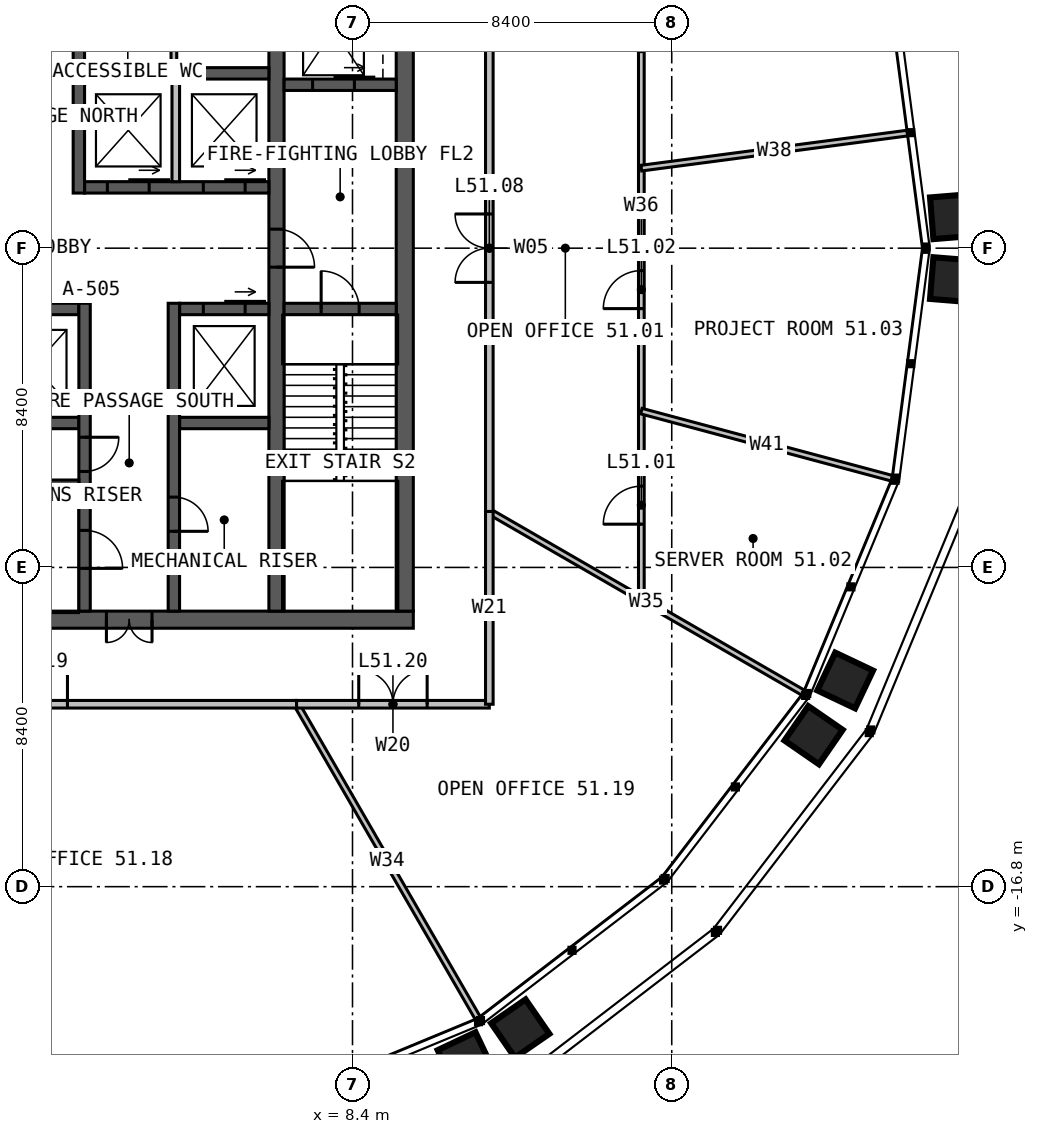
"""IFC4 building model, lengths in metres.
Left out: names, types, materials, properties, quantities, classifications, styles, units other than length and angle.
Written with IfcOpenShell. Run it as: python <this file> out.ifc"""

import sys

from ifc_helpers import new_model, si_unit, direction, frame, frame_2d, origin, place, context, subcontext, project, spatial, rectangle, extrude, element, fill, save


model = new_model("IFC4")
c1 = context("Model", 3, precision=1e-05, world=origin(), true_north=direction((0.0, 1.0)))
c2 = subcontext(c1, "Body", "Model", "MODEL_VIEW")
j1 = project(units=[si_unit("LENGTHUNIT", "METRE"), si_unit("PLANEANGLEUNIT", "RADIAN")], contexts=[c1])
p1 = place(None, origin())
s1 = spatial("IfcSite", under=j1, at=p1, CompositionType="ELEMENT")
p2 = place(p1, origin())
s2 = spatial("IfcBuilding", under=s1, at=p2, CompositionType="ELEMENT")
p3 = place(p2, frame((0.0, 0.0, 211.0)))
s3 = spatial("IfcBuildingStorey", under=s2, at=p3, CompositionType="ELEMENT", Elevation=211.0)
p4 = place(p3, frame((10.0, -9.775, 0.0), z_axis=(0.0, 0.0, 1.0), x_axis=(-1.0, 0.0, 0.0)))
e1 = element("IfcWall", 1, at=p4, inside=s3, PredefinedType="SOLIDWALL", context=c2, shape_type="SweptSolid", body=[
    extrude(rectangle(XDim=20.0, YDim=0.45, at=frame_2d((10.0, 0.0))), origin(), (0.0, 0.0, 1.0), 4.0),
])
p5 = place(p4, frame((6.875, 0.0, 0.0)))
e2 = element("IfcOpeningElement", 2, at=p5, cuts=e1, PredefinedType="OPENING", context=c2, shape_type="SweptSolid", body=[
    extrude(rectangle(XDim=1.2, YDim=2.2, at=frame_2d((0.6, 1.1))), frame((0.0, 0.235, 0.0), z_axis=(0.0, -1.0, 0.0), x_axis=(1.0, 0.0, 0.0)), (0.0, 0.0, 1.0), 0.47),
])
p6 = place(p3, frame((9.775, -9.55, 0.0), z_axis=(0.0, 0.0, 1.0), x_axis=(0.0, 1.0, 0.0)))
e3 = element("IfcWall", 3, at=p6, inside=s3, PredefinedType="SOLIDWALL", context=c2, shape_type="SweptSolid", body=[
    extrude(rectangle(XDim=19.1, YDim=0.45, at=frame_2d((9.55, 0.0))), origin(), (0.0, 0.0, 1.0), 4.0),
])
p7 = place(p3, frame((6.4, 9.55, 0.0), z_axis=(0.0, 0.0, 1.0), x_axis=(0.0, -1.0, 0.0)))
e4 = element("IfcWall", 4, at=p7, inside=s3, PredefinedType="SOLIDWALL", context=c2, shape_type="SweptSolid", body=[
    extrude(rectangle(XDim=19.1, YDim=0.4, at=frame_2d((9.55, 0.0))), origin(), (0.0, 0.0, 1.0), 4.0),
])
p8 = place(p7, frame((9.05, 0.0, 0.0)))
e5 = element("IfcOpeningElement", 5, at=p8, cuts=e4, PredefinedType="OPENING", context=c2, shape_type="SweptSolid", body=[
    extrude(rectangle(XDim=1.0, YDim=2.2, at=frame_2d((0.5, 1.1))), frame((0.0, 0.21, 0.0), z_axis=(0.0, -1.0, 0.0), x_axis=(1.0, 0.0, 0.0)), (0.0, 0.0, 1.0), 0.42),
])
p9 = place(p3, frame((1.35, 1.6, 0.0), z_axis=(0.0, 0.0, 1.0), x_axis=(1.0, 0.0, 0.0)))
e6 = element("IfcWall", 6, at=p9, inside=s3, PredefinedType="SOLIDWALL", context=c2, shape_type="SweptSolid", body=[
    extrude(rectangle(XDim=4.85, YDim=0.3, at=frame_2d((2.425, 0.0))), origin(), (0.0, 0.0, 1.0), 4.0),
])
p10 = place(p9, frame((0.6, 0.0, 0.0)))
e7 = element("IfcOpeningElement", 7, at=p10, cuts=e6, PredefinedType="OPENING", context=c2, shape_type="SweptSolid", body=[
    extrude(rectangle(XDim=1.1, YDim=2.2, at=frame_2d((0.55, 1.1))), frame((0.0, 0.16, 0.0), z_axis=(0.0, -1.0, 0.0), x_axis=(1.0, 0.0, 0.0)), (0.0, 0.0, 1.0), 0.32),
])
p11 = place(p9, frame((3.125, 0.0, 0.0)))
e8 = element("IfcOpeningElement", 8, at=p11, cuts=e6, PredefinedType="OPENING", context=c2, shape_type="SweptSolid", body=[
    extrude(rectangle(XDim=1.1, YDim=2.2, at=frame_2d((0.55, 1.1))), frame((0.0, 0.16, 0.0), z_axis=(0.0, -1.0, 0.0), x_axis=(1.0, 0.0, 0.0)), (0.0, 0.0, 1.0), 0.32),
])
p12 = place(p3, frame((1.35, 4.6, 0.0), z_axis=(0.0, 0.0, 1.0), x_axis=(1.0, 0.0, 0.0)))
e9 = element("IfcWall", 9, at=p12, inside=s3, PredefinedType="SOLIDWALL", context=c2, shape_type="SweptSolid", body=[
    extrude(rectangle(XDim=4.85, YDim=0.3, at=frame_2d((2.425, 0.0))), origin(), (0.0, 0.0, 1.0), 4.0),
])
p13 = place(p3, frame((1.2, 1.45, 0.0), z_axis=(0.0, 0.0, 1.0), x_axis=(0.0, 1.0, 0.0)))
e10 = element("IfcWall", 10, at=p13, inside=s3, PredefinedType="SOLIDWALL", context=c2, shape_type="SweptSolid", body=[
    extrude(rectangle(XDim=8.1, YDim=0.3, at=frame_2d((4.05, 0.0))), origin(), (0.0, 0.0, 1.0), 4.0),
])
p14 = place(p13, frame((3.8, 0.0, 0.0)))
e11 = element("IfcOpeningElement", 11, at=p14, cuts=e10, PredefinedType="OPENING", context=c2, shape_type="SweptSolid", body=[
    extrude(rectangle(XDim=1.0, YDim=2.2, at=frame_2d((0.5, 1.1))), frame((0.0, 0.16, 0.0), z_axis=(0.0, -1.0, 0.0), x_axis=(1.0, 0.0, 0.0)), (0.0, 0.0, 1.0), 0.32),
])
p15 = place(p13, frame((6.15, 0.0, 0.0)))
e12 = element("IfcOpeningElement", 12, at=p15, cuts=e10, PredefinedType="OPENING", context=c2, shape_type="SweptSolid", body=[
    extrude(rectangle(XDim=1.0, YDim=2.2, at=frame_2d((0.5, 1.1))), frame((0.0, 0.16, 0.0), z_axis=(0.0, -1.0, 0.0), x_axis=(1.0, 0.0, 0.0)), (0.0, 0.0, 1.0), 0.32),
])
p16 = place(p3, frame((-6.2, -1.6, 0.0), z_axis=(0.0, 0.0, 1.0), x_axis=(1.0, 0.0, 0.0)))
e13 = element("IfcWall", 13, at=p16, inside=s3, PredefinedType="SOLIDWALL", context=c2, shape_type="SweptSolid", body=[
    extrude(rectangle(XDim=7.4, YDim=0.3, at=frame_2d((3.7, 0.0))), origin(), (0.0, 0.0, 1.0), 4.0),
])
p17 = place(p3, frame((3.85, -1.6, 0.0), z_axis=(0.0, 0.0, 1.0), x_axis=(1.0, 0.0, 0.0)))
e14 = element("IfcWall", 14, at=p17, inside=s3, PredefinedType="SOLIDWALL", context=c2, shape_type="SweptSolid", body=[
    extrude(rectangle(XDim=2.35, YDim=0.3, at=frame_2d((1.175, 0.0))), origin(), (0.0, 0.0, 1.0), 4.0),
])
p18 = place(p17, frame((0.625, 0.0, 0.0)))
e15 = element("IfcOpeningElement", 15, at=p18, cuts=e14, PredefinedType="OPENING", context=c2, shape_type="SweptSolid", body=[
    extrude(rectangle(XDim=1.1, YDim=2.2, at=frame_2d((0.55, 1.1))), frame((0.0, 0.16, 0.0), z_axis=(0.0, -1.0, 0.0), x_axis=(1.0, 0.0, 0.0)), (0.0, 0.0, 1.0), 0.32),
])
p19 = place(p3, frame((-6.2, -4.6, 0.0), z_axis=(0.0, 0.0, 1.0), x_axis=(1.0, 0.0, 0.0)))
e16 = element("IfcWall", 16, at=p19, inside=s3, PredefinedType="SOLIDWALL", context=c2, shape_type="SweptSolid", body=[
    extrude(rectangle(XDim=7.4, YDim=0.3, at=frame_2d((3.7, 0.0))), origin(), (0.0, 0.0, 1.0), 4.0),
])
p20 = place(p3, frame((3.85, -4.6, 0.0), z_axis=(0.0, 0.0, 1.0), x_axis=(1.0, 0.0, 0.0)))
e17 = element("IfcWall", 17, at=p20, inside=s3, PredefinedType="SOLIDWALL", context=c2, shape_type="SweptSolid", body=[
    extrude(rectangle(XDim=2.35, YDim=0.3, at=frame_2d((1.175, 0.0))), origin(), (0.0, 0.0, 1.0), 4.0),
])
p21 = place(p3, frame((1.35, -1.45, 0.0), z_axis=(0.0, 0.0, 1.0), x_axis=(0.0, -1.0, 0.0)))
e18 = element("IfcWall", 18, at=p21, inside=s3, PredefinedType="SOLIDWALL", context=c2, shape_type="SweptSolid", body=[
    extrude(rectangle(XDim=8.1, YDim=0.3, at=frame_2d((4.05, 0.0))), origin(), (0.0, 0.0, 1.0), 4.0),
])
p22 = place(p21, frame((5.975, 0.0, 0.0)))
e19 = element("IfcOpeningElement", 19, at=p22, cuts=e18, PredefinedType="OPENING", context=c2, shape_type="SweptSolid", body=[
    extrude(rectangle(XDim=1.0, YDim=2.2, at=frame_2d((0.5, 1.1))), frame((0.0, 0.16, 0.0), z_axis=(0.0, -1.0, 0.0), x_axis=(1.0, 0.0, 0.0)), (0.0, 0.0, 1.0), 0.32),
])
p23 = place(p21, frame((3.525, 0.0, 0.0)))
e20 = element("IfcOpeningElement", 20, at=p23, cuts=e18, PredefinedType="OPENING", context=c2, shape_type="SweptSolid", body=[
    extrude(rectangle(XDim=0.9, YDim=2.2, at=frame_2d((0.45, 1.1))), frame((0.0, 0.16, 0.0), z_axis=(0.0, -1.0, 0.0), x_axis=(1.0, 0.0, 0.0)), (0.0, 0.0, 1.0), 0.32),
])
p24 = place(p3, frame((3.7, -1.45, 0.0), z_axis=(0.0, 0.0, 1.0), x_axis=(0.0, -1.0, 0.0)))
e21 = element("IfcWall", 21, at=p24, inside=s3, PredefinedType="SOLIDWALL", context=c2, shape_type="SweptSolid", body=[
    extrude(rectangle(XDim=8.1, YDim=0.3, at=frame_2d((4.05, 0.0))), origin(), (0.0, 0.0, 1.0), 4.0),
])
p25 = place(p24, frame((5.1, 0.0, 0.0)))
e22 = element("IfcOpeningElement", 22, at=p25, cuts=e21, PredefinedType="OPENING", context=c2, shape_type="SweptSolid", body=[
    extrude(rectangle(XDim=0.9, YDim=2.2, at=frame_2d((0.45, 1.1))), frame((0.0, 0.16, 0.0), z_axis=(0.0, -1.0, 0.0), x_axis=(1.0, 0.0, 0.0)), (0.0, 0.0, 1.0), 0.32),
])
p26 = place(p3, frame((-6.2, -6.2, 0.0), z_axis=(0.0, 0.0, 1.0), x_axis=(1.0, 0.0, 0.0)))
e23 = element("IfcWall", 23, at=p26, inside=s3, PredefinedType="SOLIDWALL", context=c2, shape_type="SweptSolid", body=[
    extrude(rectangle(XDim=7.4, YDim=0.2, at=frame_2d((3.7, 0.0))), origin(), (0.0, 0.0, 1.0), 4.0),
])
p27 = place(p3, frame((6.6, -1.6, 0.0), z_axis=(0.0, 0.0, 1.0), x_axis=(1.0, 0.0, 0.0)))
e24 = element("IfcWall", 24, at=p27, inside=s3, PredefinedType="SOLIDWALL", context=c2, shape_type="SweptSolid", body=[
    extrude(rectangle(XDim=2.95, YDim=0.3, at=frame_2d((1.475, 0.0))), origin(), (0.0, 0.0, 1.0), 4.0),
])
p28 = place(p27, frame((0.975, 0.0, 0.0)))
e25 = element("IfcOpeningElement", 25, at=p28, cuts=e24, PredefinedType="OPENING", context=c2, shape_type="SweptSolid", body=[
    extrude(rectangle(XDim=1.0, YDim=2.2, at=frame_2d((0.5, 1.1))), frame((0.0, 0.16, 0.0), z_axis=(0.0, -1.0, 0.0), x_axis=(1.0, 0.0, 0.0)), (0.0, 0.0, 1.0), 0.32),
])
p29 = place(p3, frame((6.6, 4.3, 0.0), z_axis=(0.0, 0.0, 1.0), x_axis=(1.0, 0.0, 0.0)))
e26 = element("IfcWall", 26, at=p29, inside=s3, PredefinedType="SOLIDWALL", context=c2, shape_type="SweptSolid", body=[
    extrude(rectangle(XDim=2.95, YDim=0.3, at=frame_2d((1.475, 0.0))), origin(), (0.0, 0.0, 1.0), 4.0),
])
p30 = place(p29, frame((0.75, 0.0, 0.0)))
e27 = element("IfcOpeningElement", 27, at=p30, cuts=e26, PredefinedType="OPENING", context=c2, shape_type="SweptSolid", body=[
    extrude(rectangle(XDim=1.1, YDim=2.2, at=frame_2d((0.55, 1.1))), frame((0.0, 0.16, 0.0), z_axis=(0.0, -1.0, 0.0), x_axis=(1.0, 0.0, 0.0)), (0.0, 0.0, 1.0), 0.32),
])
p31 = place(p3, frame((3.75, 1.75, 0.0), z_axis=(0.0, 0.0, 1.0), x_axis=(0.0, 1.0, 0.0)))
e28 = element("IfcWall", 28, at=p31, inside=s3, PredefinedType="SOLIDWALL", context=c2, shape_type="SweptSolid", body=[
    extrude(rectangle(XDim=2.7, YDim=0.2, at=frame_2d((1.35, 0.0))), origin(), (0.0, 0.0, 1.0), 3.75),
])
p32 = place(p3, frame((3.7, 4.75, 0.0), z_axis=(0.0, 0.0, 1.0), x_axis=(0.0, 1.0, 0.0)))
e29 = element("IfcWall", 29, at=p32, inside=s3, PredefinedType="PARTITIONING", context=c2, shape_type="SweptSolid", body=[
    extrude(rectangle(XDim=1.975, YDim=0.15, at=frame_2d((0.988, 0.0))), origin(), (0.0, 0.0, 1.0), 3.75),
])
for number, where, z_axis, x_axis in (
    (30, (12.0, -6.928, 0.0), (0.0, 0.0, 1.0), (0.866, -0.5, 0.0)),
    (31, (6.928, -12.0, 0.0), (0.0, 0.0, 1.0), (0.5, -0.866, 0.0)),
):
    element("IfcWall", number, at=place(p3, frame(where, z_axis=z_axis, x_axis=x_axis)), inside=s3, PredefinedType="PARTITIONING", context=c2, shape_type="SweptSolid", body=[
        extrude(rectangle(XDim=9.541, YDim=0.15, at=frame_2d((4.771, 0.0))), origin(), (0.0, 0.0, 1.0), 2.79),
    ])
p33 = place(p3, frame((16.0, -9.238, 0.0), z_axis=(0.0, 0.0, 1.0), x_axis=(0.0, 1.0, 0.0)))
e32 = element("IfcWall", 32, at=p33, inside=s3, PredefinedType="PARTITIONING", context=c2, shape_type="SweptSolid", body=[
    extrude(rectangle(XDim=18.475, YDim=0.15, at=frame_2d((9.238, 0.0))), origin(), (0.0, 0.0, 1.0), 2.79),
])
p34 = place(p33, frame((1.975, 0.0, 0.0)))
e33 = element("IfcOpeningElement", 33, at=p34, cuts=e32, PredefinedType="OPENING", context=c2, shape_type="SweptSolid", body=[
    extrude(rectangle(XDim=1.0, YDim=2.2, at=frame_2d((0.5, 1.1))), frame((0.0, 0.085, 0.0), z_axis=(0.0, -1.0, 0.0), x_axis=(1.0, 0.0, 0.0)), (0.0, 0.0, 1.0), 0.17),
])
p35 = place(p33, frame((7.647, 0.0, 0.0)))
e34 = element("IfcOpeningElement", 34, at=p35, cuts=e32, PredefinedType="OPENING", context=c2, shape_type="SweptSolid", body=[
    extrude(rectangle(XDim=1.0, YDim=2.2, at=frame_2d((0.5, 1.1))), frame((0.0, 0.085, 0.0), z_axis=(0.0, -1.0, 0.0), x_axis=(1.0, 0.0, 0.0)), (0.0, 0.0, 1.0), 0.17),
])
p36 = place(p33, frame((14.41, 0.0, 0.0)))
e35 = element("IfcOpeningElement", 35, at=p36, cuts=e32, PredefinedType="OPENING", context=c2, shape_type="SweptSolid", body=[
    extrude(rectangle(XDim=1.0, YDim=2.2, at=frame_2d((0.5, 1.1))), frame((0.0, 0.085, 0.0), z_axis=(0.0, -1.0, 0.0), x_axis=(1.0, 0.0, 0.0)), (0.0, 0.0, 1.0), 0.17),
])
p37 = place(p3, frame((16.0, -4.287, 0.0), z_axis=(0.0, 0.0, 1.0), x_axis=(0.96592349012, -0.258827763647, 0.0)))
e36 = element("IfcWall", 36, at=p37, inside=s3, PredefinedType="PARTITIONING", context=c2, shape_type="SweptSolid", body=[
    extrude(rectangle(XDim=6.833, YDim=0.15, at=frame_2d((3.417, 0.0))), origin(), (0.0, 0.0, 1.0), 2.79),
])
p38 = place(p3, frame((16.0, 2.106, 0.0), z_axis=(0.0, 0.0, 1.0), x_axis=(0.991444639803, 0.130527875205, 0.0)))
e37 = element("IfcWall", 37, at=p38, inside=s3, PredefinedType="PARTITIONING", context=c2, shape_type="SweptSolid", body=[
    extrude(rectangle(XDim=7.059, YDim=0.15, at=frame_2d((3.529, 0.0))), origin(), (0.0, 0.0, 1.0), 2.79),
])
p39 = place(p3, frame((12.0, -6.928, 0.0), z_axis=(0.0, 0.0, 1.0), x_axis=(0.0, 1.0, 0.0)))
e38 = element("IfcWall", 38, at=p39, inside=s3, PredefinedType="PARTITIONING", context=c2, shape_type="SweptSolid", body=[
    extrude(rectangle(XDim=13.856, YDim=0.2, at=frame_2d((6.928, 0.0))), origin(), (0.0, 0.0, 1.0), 3.8),
])
p40 = place(p39, frame((6.028, 0.0, 0.0)))
e39 = element("IfcOpeningElement", 39, at=p40, cuts=e38, PredefinedType="OPENING", context=c2, shape_type="SweptSolid", body=[
    extrude(rectangle(XDim=1.8, YDim=2.2, at=frame_2d((0.9, 1.1))), frame((0.0, 0.11, 0.0), z_axis=(0.0, -1.0, 0.0), x_axis=(1.0, 0.0, 0.0)), (0.0, 0.0, 1.0), 0.22),
])
p41 = place(p3, frame((-6.928, -12.0, 0.0), z_axis=(0.0, 0.0, 1.0), x_axis=(1.0, 0.0, 0.0)))
e40 = element("IfcWall", 40, at=p41, inside=s3, PredefinedType="PARTITIONING", context=c2, shape_type="SweptSolid", body=[
    extrude(rectangle(XDim=13.856, YDim=0.2, at=frame_2d((6.928, 0.0))), origin(), (0.0, 0.0, 1.0), 3.8),
])
p42 = place(p41, frame((6.028, 0.0, 0.0)))
e41 = element("IfcOpeningElement", 41, at=p42, cuts=e40, PredefinedType="OPENING", context=c2, shape_type="SweptSolid", body=[
    extrude(rectangle(XDim=1.8, YDim=2.2, at=frame_2d((0.9, 1.1))), frame((0.0, 0.11, 0.0), z_axis=(0.0, -1.0, 0.0), x_axis=(1.0, 0.0, 0.0)), (0.0, 0.0, 1.0), 0.22),
])
p43 = place(p3, frame((6.928, -12.0, 0.0), z_axis=(0.0, 0.0, 1.0), x_axis=(1.0, 0.0, 0.0)))
e42 = element("IfcWall", 42, at=p43, inside=s3, PredefinedType="PARTITIONING", context=c2, shape_type="SweptSolid", body=[
    extrude(rectangle(XDim=5.072, YDim=0.2, at=frame_2d((2.536, 0.0))), origin(), (0.0, 0.0, 1.0), 3.8),
])
p44 = place(p43, frame((1.636, 0.0, 0.0)))
e43 = element("IfcOpeningElement", 43, at=p44, cuts=e42, PredefinedType="OPENING", context=c2, shape_type="SweptSolid", body=[
    extrude(rectangle(XDim=1.8, YDim=2.2, at=frame_2d((0.9, 1.1))), frame((0.0, 0.11, 0.0), z_axis=(0.0, -1.0, 0.0), x_axis=(1.0, 0.0, 0.0)), (0.0, 0.0, 1.0), 0.22),
])
p45 = place(p3, frame((12.0, -12.0, 0.0), z_axis=(0.0, 0.0, 1.0), x_axis=(0.0, 1.0, 0.0)))
e44 = element("IfcWall", 44, at=p45, inside=s3, PredefinedType="PARTITIONING", context=c2, shape_type="SweptSolid", body=[
    extrude(rectangle(XDim=5.072, YDim=0.2, at=frame_2d((2.536, 0.0))), origin(), (0.0, 0.0, 1.0), 3.8),
])
p46 = place(p5, origin())
e45 = element("IfcDoor", 45, at=p46, inside=s3, OperationType="DOUBLE_DOOR_SINGLE_SWING", PredefinedType="DOOR", context=c2, shape_type="SweptSolid", body=[
    extrude(rectangle(XDim=1.2, YDim=2.2, at=frame_2d((0.6, 1.1))), frame((0.0, 0.025, 0.0), z_axis=(0.0, -1.0, 0.0), x_axis=(1.0, 0.0, 0.0)), (0.0, 0.0, 1.0), 0.05),
])
fill(e2, e45)
p47 = place(p8, origin())
e46 = element("IfcDoor", 46, at=p47, inside=s3, OperationType="SINGLE_SWING_RIGHT", PredefinedType="DOOR", context=c2, shape_type="SweptSolid", body=[
    extrude(rectangle(XDim=1.0, YDim=2.2, at=frame_2d((0.5, 1.1))), frame((0.0, 0.025, 0.0), z_axis=(0.0, -1.0, 0.0), x_axis=(1.0, 0.0, 0.0)), (0.0, 0.0, 1.0), 0.05),
])
fill(e5, e46)
p48 = place(p28, origin())
e47 = element("IfcDoor", 47, at=p48, inside=s3, OperationType="SINGLE_SWING_LEFT", PredefinedType="DOOR", context=c2, shape_type="SweptSolid", body=[
    extrude(rectangle(XDim=1.0, YDim=2.2, at=frame_2d((0.5, 1.1))), frame((0.0, 0.025, 0.0), z_axis=(0.0, -1.0, 0.0), x_axis=(1.0, 0.0, 0.0)), (0.0, 0.0, 1.0), 0.05),
])
fill(e25, e47)
p49 = place(p22, origin())
e48 = element("IfcDoor", 48, at=p49, inside=s3, OperationType="SINGLE_SWING_RIGHT", PredefinedType="DOOR", context=c2, shape_type="SweptSolid", body=[
    extrude(rectangle(XDim=1.0, YDim=2.2, at=frame_2d((0.5, 1.1))), frame((0.0, 0.025, 0.0), z_axis=(0.0, -1.0, 0.0), x_axis=(1.0, 0.0, 0.0)), (0.0, 0.0, 1.0), 0.05),
])
fill(e19, e48)
p50 = place(p23, origin())
e49 = element("IfcDoor", 49, at=p50, inside=s3, OperationType="SINGLE_SWING_LEFT", PredefinedType="DOOR", context=c2, shape_type="SweptSolid", body=[
    extrude(rectangle(XDim=0.9, YDim=2.2, at=frame_2d((0.45, 1.1))), frame((0.0, 0.025, 0.0), z_axis=(0.0, -1.0, 0.0), x_axis=(1.0, 0.0, 0.0)), (0.0, 0.0, 1.0), 0.05),
])
fill(e20, e49)
p51 = place(p25, origin())
e50 = element("IfcDoor", 50, at=p51, inside=s3, OperationType="SINGLE_SWING_RIGHT", PredefinedType="DOOR", context=c2, shape_type="SweptSolid", body=[
    extrude(rectangle(XDim=0.9, YDim=2.2, at=frame_2d((0.45, 1.1))), frame((0.0, 0.025, 0.0), z_axis=(0.0, -1.0, 0.0), x_axis=(1.0, 0.0, 0.0)), (0.0, 0.0, 1.0), 0.05),
])
fill(e22, e50)
p52 = place(p10, origin())
e51 = element("IfcDoor", 51, at=p52, inside=s3, OperationType="SLIDING_TO_LEFT", PredefinedType="DOOR", context=c2, shape_type="SweptSolid", body=[
    extrude(rectangle(XDim=1.1, YDim=2.2, at=frame_2d((0.55, 1.1))), frame((0.0, 0.025, 0.0), z_axis=(0.0, -1.0, 0.0), x_axis=(1.0, 0.0, 0.0)), (0.0, 0.0, 1.0), 0.05),
])
fill(e7, e51)
p53 = place(p11, origin())
e52 = element("IfcDoor", 52, at=p53, inside=s3, OperationType="SLIDING_TO_LEFT", PredefinedType="DOOR", context=c2, shape_type="SweptSolid", body=[
    extrude(rectangle(XDim=1.1, YDim=2.2, at=frame_2d((0.55, 1.1))), frame((0.0, 0.025, 0.0), z_axis=(0.0, -1.0, 0.0), x_axis=(1.0, 0.0, 0.0)), (0.0, 0.0, 1.0), 0.05),
])
fill(e8, e52)
p54 = place(p18, origin())
e53 = element("IfcDoor", 53, at=p54, inside=s3, OperationType="SLIDING_TO_LEFT", PredefinedType="DOOR", context=c2, shape_type="SweptSolid", body=[
    extrude(rectangle(XDim=1.1, YDim=2.2, at=frame_2d((0.55, 1.1))), frame((0.0, 0.025, 0.0), z_axis=(0.0, -1.0, 0.0), x_axis=(1.0, 0.0, 0.0)), (0.0, 0.0, 1.0), 0.05),
])
fill(e15, e53)
p55 = place(p30, origin())
e54 = element("IfcDoor", 54, at=p55, inside=s3, OperationType="SLIDING_TO_LEFT", PredefinedType="DOOR", context=c2, shape_type="SweptSolid", body=[
    extrude(rectangle(XDim=1.1, YDim=2.2, at=frame_2d((0.55, 1.1))), frame((0.0, 0.025, 0.0), z_axis=(0.0, -1.0, 0.0), x_axis=(1.0, 0.0, 0.0)), (0.0, 0.0, 1.0), 0.05),
])
fill(e27, e54)
p56 = place(p34, origin())
e55 = element("IfcDoor", 55, at=p56, inside=s3, OperationType="SINGLE_SWING_LEFT", PredefinedType="DOOR", context=c2, shape_type="SweptSolid", body=[
    extrude(rectangle(XDim=1.0, YDim=2.2, at=frame_2d((0.5, 1.1))), frame((0.0, 0.025, 0.0), z_axis=(0.0, -1.0, 0.0), x_axis=(1.0, 0.0, 0.0)), (0.0, 0.0, 1.0), 0.05),
])
fill(e33, e55)
p57 = place(p35, origin())
e56 = element("IfcDoor", 56, at=p57, inside=s3, OperationType="SINGLE_SWING_LEFT", PredefinedType="DOOR", context=c2, shape_type="SweptSolid", body=[
    extrude(rectangle(XDim=1.0, YDim=2.2, at=frame_2d((0.5, 1.1))), frame((0.0, 0.025, 0.0), z_axis=(0.0, -1.0, 0.0), x_axis=(1.0, 0.0, 0.0)), (0.0, 0.0, 1.0), 0.05),
])
fill(e34, e56)
p58 = place(p40, origin())
e57 = element("IfcDoor", 57, at=p58, inside=s3, OperationType="DOUBLE_DOOR_SINGLE_SWING", PredefinedType="DOOR", context=c2, shape_type="SweptSolid", body=[
    extrude(rectangle(XDim=1.8, YDim=2.2, at=frame_2d((0.9, 1.1))), frame((0.0, 0.025, 0.0), z_axis=(0.0, -1.0, 0.0), x_axis=(1.0, 0.0, 0.0)), (0.0, 0.0, 1.0), 0.05),
])
fill(e39, e57)
p59 = place(p42, origin())
e58 = element("IfcDoor", 58, at=p59, inside=s3, OperationType="DOUBLE_DOOR_SINGLE_SWING", PredefinedType="DOOR", context=c2, shape_type="SweptSolid", body=[
    extrude(rectangle(XDim=1.8, YDim=2.2, at=frame_2d((0.9, 1.1))), frame((0.0, 0.025, 0.0), z_axis=(0.0, -1.0, 0.0), x_axis=(1.0, 0.0, 0.0)), (0.0, 0.0, 1.0), 0.05),
])
fill(e41, e58)
p60 = place(p44, origin())
e59 = element("IfcDoor", 59, at=p60, inside=s3, OperationType="DOUBLE_DOOR_SINGLE_SWING", PredefinedType="DOOR", context=c2, shape_type="SweptSolid", body=[
    extrude(rectangle(XDim=1.8, YDim=2.2, at=frame_2d((0.9, 1.1))), frame((0.0, 0.025, 0.0), z_axis=(0.0, -1.0, 0.0), x_axis=(1.0, 0.0, 0.0)), (0.0, 0.0, 1.0), 0.05),
])
fill(e43, e59)
save(model, sys.argv[1])
